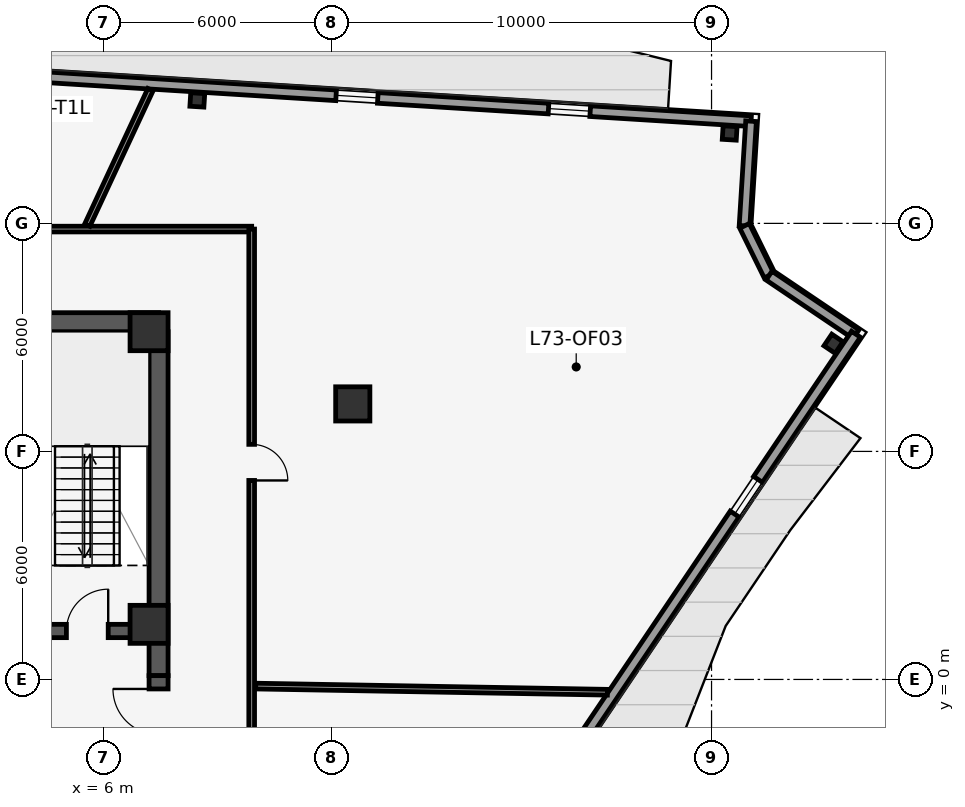
"""IFC4 building model, lengths in metres.
Left out: names, types, materials, properties, quantities, classifications, styles, units other than length and angle.
Written with IfcOpenShell. Run it as: python <this file> out.ifc"""

import sys

from ifc_helpers import new_model, si_unit, direction, frame, frame_2d, origin, origin_2d, place, context, subcontext, project, spatial, rectangle, i_section, extrude, element, fill, save


model = new_model("IFC4")
c1 = context("Model", 3, precision=1e-05, world=origin(), true_north=direction((0.0, 1.0)))
c2 = subcontext(c1, "Body", "Model", "MODEL_VIEW")
j1 = project(units=[si_unit("LENGTHUNIT", "METRE"), si_unit("PLANEANGLEUNIT", "RADIAN")], contexts=[c1])
p1 = place(None, origin())
s1 = spatial("IfcSite", under=j1, at=p1, CompositionType="ELEMENT")
p2 = place(p1, origin())
s2 = spatial("IfcBuilding", under=s1, at=p2, CompositionType="ELEMENT")
p3 = place(p2, frame((0.0, 0.0, 310.6)))
s3 = spatial("IfcBuildingStorey", under=s2, at=p3, CompositionType="ELEMENT", Elevation=310.6)
p4 = place(p3, frame((-7.45, 9.4, 0.0), z_axis=(0.0, 0.0, 1.0), x_axis=(1.0, 0.0, 0.0)))
e1 = element("IfcWall", 1, at=p4, inside=s3, PredefinedType="SHEAR", context=c2, shape_type="SweptSolid", body=[
    extrude(rectangle(XDim=14.9, YDim=0.5, at=frame_2d((7.45, 0.0))), origin(), (0.0, 0.0, 1.0), 3.85),
])
p5 = place(p4, frame((6.9, 0.0, 0.0)))
e2 = element("IfcOpeningElement", 2, at=p5, cuts=e1, PredefinedType="OPENING", context=c2, shape_type="SweptSolid", body=[
    extrude(rectangle(XDim=1.1, YDim=2.15, at=frame_2d((0.55, 1.075))), frame((0.0, 0.26, 0.0), z_axis=(0.0, -1.0, 0.0), x_axis=(1.0, 0.0, 0.0)), (0.0, 0.0, 1.0), 0.52),
])
p6 = place(p4, frame((4.23, 0.0, 0.0)))
e3 = element("IfcOpeningElement", 3, at=p6, cuts=e1, PredefinedType="OPENING", context=c2, shape_type="SweptSolid", body=[
    extrude(rectangle(XDim=0.88, YDim=2.15, at=frame_2d((0.44, 1.075))), frame((0.0, 0.26, 0.0), z_axis=(0.0, -1.0, 0.0), x_axis=(1.0, 0.0, 0.0)), (0.0, 0.0, 1.0), 0.52),
])
p7 = place(p4, frame((9.79, 0.0, 0.0)))
e4 = element("IfcOpeningElement", 4, at=p7, cuts=e1, PredefinedType="OPENING", context=c2, shape_type="SweptSolid", body=[
    extrude(rectangle(XDim=0.88, YDim=2.15, at=frame_2d((0.44, 1.075))), frame((0.0, 0.26, 0.0), z_axis=(0.0, -1.0, 0.0), x_axis=(1.0, 0.0, 0.0)), (0.0, 0.0, 1.0), 0.52),
])
p8 = place(p3, frame((-7.2, 1.275, 0.0), z_axis=(0.0, 0.0, 1.0), x_axis=(1.0, 0.0, 0.0)))
e5 = element("IfcWall", 5, at=p8, inside=s3, PredefinedType="SHEAR", context=c2, shape_type="SweptSolid", body=[
    extrude(rectangle(XDim=14.4, YDim=0.35, at=frame_2d((7.2, 0.0))), origin(), (0.0, 0.0, 1.0), 3.85),
])
p9 = place(p8, frame((3.795, 0.0, 0.0)))
e6 = element("IfcOpeningElement", 6, at=p9, cuts=e5, PredefinedType="OPENING", context=c2, shape_type="SweptSolid", body=[
    extrude(rectangle(XDim=1.25, YDim=2.25, at=frame_2d((0.625, 1.125))), frame((0.0, 0.185, 0.0), z_axis=(0.0, -1.0, 0.0), x_axis=(1.0, 0.0, 0.0)), (0.0, 0.0, 1.0), 0.37),
])
p10 = place(p8, frame((9.355, 0.0, 0.0)))
e7 = element("IfcOpeningElement", 7, at=p10, cuts=e5, PredefinedType="OPENING", context=c2, shape_type="SweptSolid", body=[
    extrude(rectangle(XDim=1.25, YDim=2.25, at=frame_2d((0.625, 1.125))), frame((0.0, 0.185, 0.0), z_axis=(0.0, -1.0, 0.0), x_axis=(1.0, 0.0, 0.0)), (0.0, 0.0, 1.0), 0.37),
])
p11 = place(p8, frame((1.075, 0.0, 0.0)))
e8 = element("IfcOpeningElement", 8, at=p11, cuts=e5, PredefinedType="OPENING", context=c2, shape_type="SweptSolid", body=[
    extrude(rectangle(XDim=1.1, YDim=2.15, at=frame_2d((0.55, 1.075))), frame((0.0, 0.185, 0.0), z_axis=(0.0, -1.0, 0.0), x_axis=(1.0, 0.0, 0.0)), (0.0, 0.0, 1.0), 0.37),
])
p12 = place(p8, frame((12.225, 0.0, 0.0)))
e9 = element("IfcOpeningElement", 9, at=p12, cuts=e5, PredefinedType="OPENING", context=c2, shape_type="SweptSolid", body=[
    extrude(rectangle(XDim=1.1, YDim=2.15, at=frame_2d((0.55, 1.075))), frame((0.0, 0.185, 0.0), z_axis=(0.0, -1.0, 0.0), x_axis=(1.0, 0.0, 0.0)), (0.0, 0.0, 1.0), 0.37),
])
p13 = place(p3, frame((7.45, 0.1, 0.0), z_axis=(0.0, 0.0, 1.0), x_axis=(0.0, 1.0, 0.0)))
e10 = element("IfcWall", 10, at=p13, inside=s3, PredefinedType="SHEAR", context=c2, shape_type="SweptSolid", body=[
    extrude(rectangle(XDim=9.05, YDim=0.5, at=frame_2d((4.525, 0.0))), origin(), (0.0, 0.0, 1.0), 3.85),
])
p14 = place(p3, frame((7.45, -9.0, 0.0), z_axis=(0.0, 0.0, 1.0), x_axis=(0.0, 1.0, 0.0)))
e11 = element("IfcWall", 11, at=p14, inside=s3, PredefinedType="SHEAR", context=c2, shape_type="SweptSolid", body=[
    extrude(rectangle(XDim=9.1, YDim=0.5, at=frame_2d((4.55, 0.0))), origin(), (0.0, 0.0, 1.0), 3.85),
])
p15 = place(p14, frame((2.64, 0.0, 0.0)))
e12 = element("IfcOpeningElement", 12, at=p15, cuts=e11, PredefinedType="OPENING", context=c2, shape_type="SweptSolid", body=[
    extrude(rectangle(XDim=1.8, YDim=2.2, at=frame_2d((0.9, 1.1))), frame((0.0, 0.26, 0.0), z_axis=(0.0, -1.0, 0.0), x_axis=(1.0, 0.0, 0.0)), (0.0, 0.0, 1.0), 0.52),
])
p16 = place(p14, frame((7.55, 0.0, 0.0)))
e13 = element("IfcOpeningElement", 13, at=p16, cuts=e11, PredefinedType="OPENING", context=c2, shape_type="SweptSolid", body=[
    extrude(rectangle(XDim=1.2, YDim=2.15, at=frame_2d((0.6, 1.075))), frame((0.0, 0.26, 0.0), z_axis=(0.0, -1.0, 0.0), x_axis=(1.0, 0.0, 0.0)), (0.0, 0.0, 1.0), 0.52),
])
for number, where, z_axis, x_axis in (
    (14, (7.2, 1.45, 0.0), (0.0, 0.0, 1.0), (1.0, 0.0, 0.0)),
    (15, (7.2, 9.15, 0.0), (0.0, 0.0, 1.0), (1.0, 0.0, 0.0)),
):
    element("IfcColumn", number, at=place(p3, frame(where, z_axis=z_axis, x_axis=x_axis)), inside=s3, PredefinedType="COLUMN", context=c2, shape_type="SweptSolid", body=[
        extrude(rectangle(XDim=1.0, YDim=1.0, at=origin_2d()), origin(), (0.0, 0.0, 1.0), 4.1),
    ])
p17 = place(p3, frame((12.56, 7.25, 0.0), z_axis=(0.0, 0.0, 1.0), x_axis=(1.0, 0.0, 0.0)))
e16 = element("IfcColumn", 16, at=p17, inside=s3, PredefinedType="COLUMN", context=c2, shape_type="SweptSolid", body=[
    extrude(rectangle(XDim=0.9, YDim=0.9, at=origin_2d()), origin(), (0.0, 0.0, 1.0), 4.1),
])
for number, where, z_axis, x_axis in (
    (17, (25.209, 8.833, 0.0), (0.0, 0.0, 1.0), (0.559, 0.829, 0.0)),
    (18, (22.477, 14.379, 0.0), (0.0, 0.0, 1.0), (-0.998, 0.062, 0.0)),
    (19, (8.469, 15.249, 0.0), (0.0, 0.0, 1.0), (-0.998, 0.062, 0.0)),
):
    element("IfcColumn", number, at=place(p3, frame(where, z_axis=z_axis, x_axis=x_axis)), inside=s3, PredefinedType="COLUMN", context=c2, shape_type="SweptSolid", body=[
        extrude(i_section(OverallWidth=0.368, OverallDepth=0.356, WebThickness=0.011, FlangeThickness=0.018, at=origin_2d()), origin(), (0.0, 0.0, 1.0), 4.1),
    ])
p18 = place(p3, frame((-20.056, 17.376, 0.0), z_axis=(0.0, 0.0, 1.0), x_axis=(0.998061236898, -0.06223959674, 0.0)))
e20 = element("IfcWall", 20, at=p18, inside=s3, PredefinedType="STANDARD", context=c2, shape_type="SweptSolid", body=[
    extrude(rectangle(XDim=43.18, YDim=0.28, at=frame_2d((21.59, 0.0))), origin(), (0.0, 0.0, 1.0), 3.85),
])
p19 = place(p18, frame((23.681, 0.0, 0.0)))
e21 = element("IfcOpeningElement", 21, at=p19, cuts=e20, PredefinedType="OPENING", context=c2, shape_type="SweptSolid", body=[
    extrude(rectangle(XDim=1.0, YDim=2.15, at=frame_2d((0.5, 1.075))), frame((0.0, 0.15, 0.0), z_axis=(0.0, -1.0, 0.0), x_axis=(1.0, 0.0, 0.0)), (0.0, 0.0, 1.0), 0.3),
])
p20 = place(p18, frame((4.24, 0.0, 0.85)))
e22 = element("IfcOpeningElement", 22, at=p20, cuts=e20, PredefinedType="OPENING", context=c2, shape_type="SweptSolid", body=[
    extrude(rectangle(XDim=1.1, YDim=2.15, at=frame_2d((0.55, 1.075))), frame((0.0, 0.15, 0.0), z_axis=(0.0, -1.0, 0.0), x_axis=(1.0, 0.0, 0.0)), (0.0, 0.0, 1.0), 0.3),
])
p21 = place(p18, frame((9.84, 0.0, 0.85)))
e23 = element("IfcOpeningElement", 23, at=p21, cuts=e20, PredefinedType="OPENING", context=c2, shape_type="SweptSolid", body=[
    extrude(rectangle(XDim=1.1, YDim=2.15, at=frame_2d((0.55, 1.075))), frame((0.0, 0.15, 0.0), z_axis=(0.0, -1.0, 0.0), x_axis=(1.0, 0.0, 0.0)), (0.0, 0.0, 1.0), 0.3),
])
p22 = place(p18, frame((21.04, 0.0, 0.85)))
e24 = element("IfcOpeningElement", 24, at=p22, cuts=e20, PredefinedType="OPENING", context=c2, shape_type="SweptSolid", body=[
    extrude(rectangle(XDim=1.1, YDim=2.15, at=frame_2d((0.55, 1.075))), frame((0.0, 0.15, 0.0), z_axis=(0.0, -1.0, 0.0), x_axis=(1.0, 0.0, 0.0)), (0.0, 0.0, 1.0), 0.3),
])
p23 = place(p18, frame((32.24, 0.0, 0.85)))
e25 = element("IfcOpeningElement", 25, at=p23, cuts=e20, PredefinedType="OPENING", context=c2, shape_type="SweptSolid", body=[
    extrude(rectangle(XDim=1.1, YDim=2.15, at=frame_2d((0.55, 1.075))), frame((0.0, 0.15, 0.0), z_axis=(0.0, -1.0, 0.0), x_axis=(1.0, 0.0, 0.0)), (0.0, 0.0, 1.0), 0.3),
])
p24 = place(p18, frame((37.84, 0.0, 0.85)))
e26 = element("IfcOpeningElement", 26, at=p24, cuts=e20, PredefinedType="OPENING", context=c2, shape_type="SweptSolid", body=[
    extrude(rectangle(XDim=1.1, YDim=2.15, at=frame_2d((0.55, 1.075))), frame((0.0, 0.15, 0.0), z_axis=(0.0, -1.0, 0.0), x_axis=(1.0, 0.0, 0.0)), (0.0, 0.0, 1.0), 0.3),
])
p25 = place(p3, frame((23.04, 14.689, 0.0), z_axis=(0.0, 0.0, 1.0), x_axis=(-0.062295651102, -0.998057739739, 0.0)))
e27 = element("IfcWall", 27, at=p25, inside=s3, PredefinedType="STANDARD", context=c2, shape_type="SweptSolid", body=[
    extrude(rectangle(XDim=2.759, YDim=0.28, at=frame_2d((1.379, 0.0))), origin(), (0.0, 0.0, 1.0), 3.85),
])
p26 = place(p3, frame((22.868, 11.935, 0.0), z_axis=(0.0, 0.0, 1.0), x_axis=(0.441785524615, -0.897120699929, 0.0)))
e28 = element("IfcWall", 28, at=p26, inside=s3, PredefinedType="STANDARD", context=c2, shape_type="SweptSolid", body=[
    extrude(rectangle(XDim=1.459, YDim=0.28, at=frame_2d((0.73, 0.0))), origin(), (0.0, 0.0, 1.0), 3.85),
])
p27 = place(p3, frame((23.513, 10.626, 0.0), z_axis=(0.0, 0.0, 1.0), x_axis=(0.829056864924, -0.559164300294, 0.0)))
e29 = element("IfcWall", 29, at=p27, inside=s3, PredefinedType="STANDARD", context=c2, shape_type="SweptSolid", body=[
    extrude(rectangle(XDim=2.759, YDim=0.28, at=frame_2d((1.379, 0.0))), origin(), (0.0, 0.0, 1.0), 3.85),
])
p28 = place(p3, frame((25.8, 9.083, 0.0), z_axis=(0.0, 0.0, 1.0), x_axis=(-0.55919392155, -0.829036885851, 0.0)))
e30 = element("IfcWall", 30, at=p28, inside=s3, PredefinedType="STANDARD", context=c2, shape_type="SweptSolid", body=[
    extrude(rectangle(XDim=43.915, YDim=0.28, at=frame_2d((21.958, 0.0))), origin(), (0.0, 0.0, 1.0), 3.85),
])
p29 = place(p28, frame((21.457, 0.0, 0.0)))
e31 = element("IfcOpeningElement", 31, at=p29, cuts=e30, PredefinedType="OPENING", context=c2, shape_type="SweptSolid", body=[
    extrude(rectangle(XDim=1.0, YDim=2.15, at=frame_2d((0.5, 1.075))), frame((0.0, 0.15, 0.0), z_axis=(0.0, -1.0, 0.0), x_axis=(1.0, 0.0, 0.0)), (0.0, 0.0, 1.0), 0.3),
])
p30 = place(p28, frame((4.607, 0.0, 0.85)))
e32 = element("IfcOpeningElement", 32, at=p30, cuts=e30, PredefinedType="OPENING", context=c2, shape_type="SweptSolid", body=[
    extrude(rectangle(XDim=1.1, YDim=2.15, at=frame_2d((0.55, 1.075))), frame((0.0, 0.15, 0.0), z_axis=(0.0, -1.0, 0.0), x_axis=(1.0, 0.0, 0.0)), (0.0, 0.0, 1.0), 0.3),
])
p31 = place(p28, frame((15.807, 0.0, 0.85)))
e33 = element("IfcOpeningElement", 33, at=p31, cuts=e30, PredefinedType="OPENING", context=c2, shape_type="SweptSolid", body=[
    extrude(rectangle(XDim=1.1, YDim=2.15, at=frame_2d((0.55, 1.075))), frame((0.0, 0.15, 0.0), z_axis=(0.0, -1.0, 0.0), x_axis=(1.0, 0.0, 0.0)), (0.0, 0.0, 1.0), 0.3),
])
p32 = place(p28, frame((27.007, 0.0, 0.85)))
e34 = element("IfcOpeningElement", 34, at=p32, cuts=e30, PredefinedType="OPENING", context=c2, shape_type="SweptSolid", body=[
    extrude(rectangle(XDim=1.1, YDim=2.15, at=frame_2d((0.55, 1.075))), frame((0.0, 0.15, 0.0), z_axis=(0.0, -1.0, 0.0), x_axis=(1.0, 0.0, 0.0)), (0.0, 0.0, 1.0), 0.3),
])
p33 = place(p28, frame((32.607, 0.0, 0.85)))
e35 = element("IfcOpeningElement", 35, at=p33, cuts=e30, PredefinedType="OPENING", context=c2, shape_type="SweptSolid", body=[
    extrude(rectangle(XDim=1.1, YDim=2.15, at=frame_2d((0.55, 1.075))), frame((0.0, 0.15, 0.0), z_axis=(0.0, -1.0, 0.0), x_axis=(1.0, 0.0, 0.0)), (0.0, 0.0, 1.0), 0.3),
])
p34 = place(p28, frame((38.207, 0.0, 0.85)))
e36 = element("IfcOpeningElement", 36, at=p34, cuts=e30, PredefinedType="OPENING", context=c2, shape_type="SweptSolid", body=[
    extrude(rectangle(XDim=1.1, YDim=2.15, at=frame_2d((0.55, 1.075))), frame((0.0, 0.15, 0.0), z_axis=(0.0, -1.0, 0.0), x_axis=(1.0, 0.0, 0.0)), (0.0, 0.0, 1.0), 0.3),
])
p35 = place(p3, frame((-2.22, 11.85, 0.0), z_axis=(0.0, 0.0, 1.0), x_axis=(1.0, 0.0, 0.0)))
e37 = element("IfcWall", 37, at=p35, inside=s3, PredefinedType="PARTITIONING", context=c2, shape_type="SweptSolid", body=[
    extrude(rectangle(XDim=12.12, YDim=0.15, at=frame_2d((6.06, 0.0))), origin(), (0.0, 0.0, 1.0), 3.85),
])
p36 = place(p35, frame((3.544, 0.0, 0.0)))
e38 = element("IfcOpeningElement", 38, at=p36, cuts=e37, PredefinedType="OPENING", context=c2, shape_type="SweptSolid", body=[
    extrude(rectangle(XDim=0.95, YDim=2.15, at=frame_2d((0.475, 1.075))), frame((0.0, 0.085, 0.0), z_axis=(0.0, -1.0, 0.0), x_axis=(1.0, 0.0, 0.0)), (0.0, 0.0, 1.0), 0.17),
])
p37 = place(p3, frame((9.9, 11.85, 0.0), z_axis=(0.0, 0.0, 1.0), x_axis=(0.0, -1.0, 0.0)))
e39 = element("IfcWall", 39, at=p37, inside=s3, PredefinedType="PARTITIONING", context=c2, shape_type="SweptSolid", body=[
    extrude(rectangle(XDim=21.198, YDim=0.15, at=frame_2d((10.599, 0.0))), origin(), (0.0, 0.0, 1.0), 3.85),
])
p38 = place(p37, frame((16.009, 0.0, 0.0)))
e40 = element("IfcOpeningElement", 40, at=p38, cuts=e39, PredefinedType="OPENING", context=c2, shape_type="SweptSolid", body=[
    extrude(rectangle(XDim=0.95, YDim=2.15, at=frame_2d((0.475, 1.075))), frame((0.0, 0.085, 0.0), z_axis=(0.0, -1.0, 0.0), x_axis=(1.0, 0.0, 0.0)), (0.0, 0.0, 1.0), 0.17),
])
p39 = place(p37, frame((5.664, 0.0, 0.0)))
e41 = element("IfcOpeningElement", 41, at=p39, cuts=e39, PredefinedType="OPENING", context=c2, shape_type="SweptSolid", body=[
    extrude(rectangle(XDim=0.95, YDim=2.15, at=frame_2d((0.475, 1.075))), frame((0.0, 0.085, 0.0), z_axis=(0.0, -1.0, 0.0), x_axis=(1.0, 0.0, 0.0)), (0.0, 0.0, 1.0), 0.17),
])
p40 = place(p3, frame((5.575, 11.955, 0.0), z_axis=(0.0, 0.0, 1.0), x_axis=(0.422633924121, 0.906300483384, 0.0)))
e42 = element("IfcWall", 42, at=p40, inside=s3, PredefinedType="PARTITIONING", context=c2, shape_type="SweptSolid", body=[
    extrude(rectangle(XDim=3.932, YDim=0.15, at=frame_2d((1.966, 0.0))), origin(), (0.0, 0.0, 1.0), 3.85),
])
p41 = place(p3, frame((10.005, -0.175, 0.0), z_axis=(0.0, 0.0, 1.0), x_axis=(0.999847550881, -0.017460670009, 0.0)))
e43 = element("IfcWall", 43, at=p41, inside=s3, PredefinedType="PARTITIONING", context=c2, shape_type="SweptSolid", body=[
    extrude(rectangle(XDim=9.256, YDim=0.15, at=frame_2d((4.628, 0.0))), origin(), (0.0, 0.0, 1.0), 3.85),
])
p42 = place(p23, origin())
e44 = element("IfcWindow", 44, at=p42, inside=s3, PartitioningType="SINGLE_PANEL", PredefinedType="WINDOW", context=c2, shape_type="SweptSolid", body=[
    extrude(rectangle(XDim=1.1, YDim=2.15, at=frame_2d((0.55, 1.075))), frame((0.0, 0.03, 0.0), z_axis=(0.0, -1.0, 0.0), x_axis=(1.0, 0.0, 0.0)), (0.0, 0.0, 1.0), 0.06),
])
fill(e25, e44)
p43 = place(p24, origin())
e45 = element("IfcWindow", 45, at=p43, inside=s3, PartitioningType="SINGLE_PANEL", PredefinedType="WINDOW", context=c2, shape_type="SweptSolid", body=[
    extrude(rectangle(XDim=1.1, YDim=2.15, at=frame_2d((0.55, 1.075))), frame((0.0, 0.03, 0.0), z_axis=(0.0, -1.0, 0.0), x_axis=(1.0, 0.0, 0.0)), (0.0, 0.0, 1.0), 0.06),
])
fill(e26, e45)
p44 = place(p30, origin())
e46 = element("IfcWindow", 46, at=p44, inside=s3, PartitioningType="SINGLE_PANEL", PredefinedType="WINDOW", context=c2, shape_type="SweptSolid", body=[
    extrude(rectangle(XDim=1.1, YDim=2.15, at=frame_2d((0.55, 1.075))), frame((0.0, 0.03, 0.0), z_axis=(0.0, -1.0, 0.0), x_axis=(1.0, 0.0, 0.0)), (0.0, 0.0, 1.0), 0.06),
])
fill(e32, e46)
p45 = place(p12, origin())
e47 = element("IfcDoor", 47, at=p45, inside=s3, OperationType="SINGLE_SWING_RIGHT", PredefinedType="DOOR", context=c2, shape_type="SweptSolid", body=[
    extrude(rectangle(XDim=1.1, YDim=2.15, at=frame_2d((0.55, 1.075))), frame((0.0, 0.025, 0.0), z_axis=(0.0, -1.0, 0.0), x_axis=(1.0, 0.0, 0.0)), (0.0, 0.0, 1.0), 0.05),
])
fill(e9, e47)
p46 = place(p16, origin())
e48 = element("IfcDoor", 48, at=p46, inside=s3, OperationType="SINGLE_SWING_RIGHT", PredefinedType="DOOR", context=c2, shape_type="SweptSolid", body=[
    extrude(rectangle(XDim=1.2, YDim=2.15, at=frame_2d((0.6, 1.075))), frame((0.0, 0.025, 0.0), z_axis=(0.0, -1.0, 0.0), x_axis=(1.0, 0.0, 0.0)), (0.0, 0.0, 1.0), 0.05),
])
fill(e13, e48)
p47 = place(p39, origin())
e49 = element("IfcDoor", 49, at=p47, inside=s3, OperationType="SINGLE_SWING_RIGHT", PredefinedType="DOOR", context=c2, shape_type="SweptSolid", body=[
    extrude(rectangle(XDim=0.95, YDim=2.15, at=frame_2d((0.475, 1.075))), frame((0.0, 0.025, 0.0), z_axis=(0.0, -1.0, 0.0), x_axis=(1.0, 0.0, 0.0)), (0.0, 0.0, 1.0), 0.05),
])
fill(e41, e49)
save(model, sys.argv[1])
